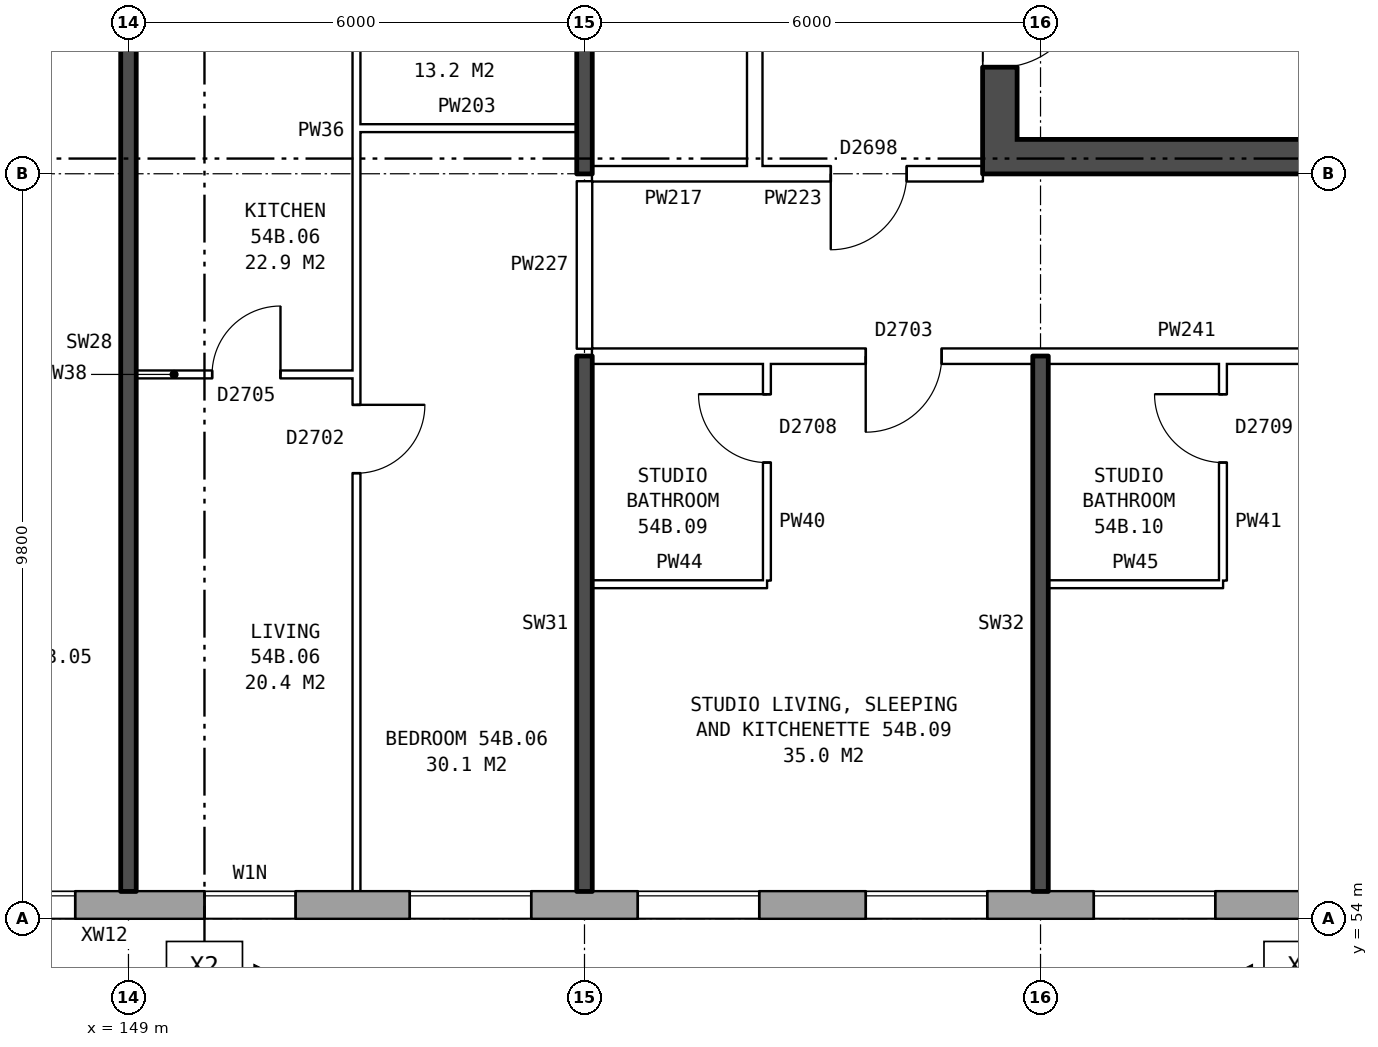
"""IFC4 building model, lengths in metres.
Left out: names, types, materials, properties, quantities, classifications, styles, units other than length and angle.
Written with IfcOpenShell. Run it as: python <this file> out.ifc"""

import sys

from ifc_helpers import new_model, si_unit, direction, frame, frame_2d, origin, place, context, subcontext, project, spatial, rectangle, extrude, element, fill, save


model = new_model("IFC4")
c1 = context("Model", 3, precision=1e-05, world=origin(), true_north=direction((0.0, 1.0)))
c2 = subcontext(c1, "Body", "Model", "MODEL_VIEW")
j1 = project(units=[si_unit("LENGTHUNIT", "METRE"), si_unit("PLANEANGLEUNIT", "RADIAN")], contexts=[c1])
p1 = place(None, origin())
s1 = spatial("IfcSite", under=j1, at=p1, CompositionType="ELEMENT")
p2 = place(p1, origin())
s2 = spatial("IfcBuilding", under=s1, at=p2, CompositionType="ELEMENT")
p3 = place(p2, frame((0.0, 0.0, 191.3)))
s3 = spatial("IfcBuildingStorey", under=s2, at=p3, CompositionType="ELEMENT", Elevation=191.3)
p4 = place(p3, frame((134.075, 54.18, 0.0), z_axis=(0.0, 0.0, 1.0), x_axis=(1.0, 0.0, 0.0)))
e1 = element("IfcWall", 1, at=p4, inside=s3, PredefinedType="STANDARD", context=c2, shape_type="SweptSolid", body=[
    extrude(rectangle(XDim=33.101, YDim=0.36, at=frame_2d((16.55, 0.0))), origin(), (0.0, 0.0, 1.0), 2.85),
])
p5 = place(p4, frame((0.625, 0.0, 0.8)))
e2 = element("IfcOpeningElement", 2, at=p5, cuts=e1, PredefinedType="OPENING", context=c2, shape_type="SweptSolid", body=[
    extrude(rectangle(XDim=1.6, YDim=1.8, at=frame_2d((0.8, 0.9))), frame((0.0, 0.19, 0.0), z_axis=(0.0, -1.0, 0.0), x_axis=(1.0, 0.0, 0.0)), (0.0, 0.0, 1.0), 0.38),
])
p6 = place(p4, frame((3.625, 0.0, 0.8)))
e3 = element("IfcOpeningElement", 3, at=p6, cuts=e1, PredefinedType="OPENING", context=c2, shape_type="SweptSolid", body=[
    extrude(rectangle(XDim=1.6, YDim=1.8, at=frame_2d((0.8, 0.9))), frame((0.0, 0.19, 0.0), z_axis=(0.0, -1.0, 0.0), x_axis=(1.0, 0.0, 0.0)), (0.0, 0.0, 1.0), 0.38),
])
p7 = place(p4, frame((6.625, 0.0, 0.8)))
e4 = element("IfcOpeningElement", 4, at=p7, cuts=e1, PredefinedType="OPENING", context=c2, shape_type="SweptSolid", body=[
    extrude(rectangle(XDim=1.6, YDim=1.8, at=frame_2d((0.8, 0.9))), frame((0.0, 0.19, 0.0), z_axis=(0.0, -1.0, 0.0), x_axis=(1.0, 0.0, 0.0)), (0.0, 0.0, 1.0), 0.38),
])
p8 = place(p4, frame((9.625, 0.0, 0.8)))
e5 = element("IfcOpeningElement", 5, at=p8, cuts=e1, PredefinedType="OPENING", context=c2, shape_type="SweptSolid", body=[
    extrude(rectangle(XDim=1.6, YDim=1.8, at=frame_2d((0.8, 0.9))), frame((0.0, 0.19, 0.0), z_axis=(0.0, -1.0, 0.0), x_axis=(1.0, 0.0, 0.0)), (0.0, 0.0, 1.0), 0.38),
])
p9 = place(p4, frame((12.625, 0.0, 0.8)))
e6 = element("IfcOpeningElement", 6, at=p9, cuts=e1, PredefinedType="OPENING", context=c2, shape_type="SweptSolid", body=[
    extrude(rectangle(XDim=1.6, YDim=1.8, at=frame_2d((0.8, 0.9))), frame((0.0, 0.19, 0.0), z_axis=(0.0, -1.0, 0.0), x_axis=(1.0, 0.0, 0.0)), (0.0, 0.0, 1.0), 0.38),
])
p10 = place(p4, frame((15.925, 0.0, 0.15)))
e7 = element("IfcOpeningElement", 7, at=p10, cuts=e1, PredefinedType="OPENING", context=c2, shape_type="SweptSolid", body=[
    extrude(rectangle(XDim=1.2, YDim=1.2, at=frame_2d((0.6, 0.6))), frame((0.0, 0.19, 0.0), z_axis=(0.0, -1.0, 0.0), x_axis=(1.0, 0.0, 0.0)), (0.0, 0.0, 1.0), 0.38),
])
p11 = place(p4, frame((18.625, 0.0, 0.8)))
e8 = element("IfcOpeningElement", 8, at=p11, cuts=e1, PredefinedType="OPENING", context=c2, shape_type="SweptSolid", body=[
    extrude(rectangle(XDim=1.6, YDim=1.8, at=frame_2d((0.8, 0.9))), frame((0.0, 0.19, 0.0), z_axis=(0.0, -1.0, 0.0), x_axis=(1.0, 0.0, 0.0)), (0.0, 0.0, 1.0), 0.38),
])
p12 = place(p4, frame((21.625, 0.0, 0.8)))
e9 = element("IfcOpeningElement", 9, at=p12, cuts=e1, PredefinedType="OPENING", context=c2, shape_type="SweptSolid", body=[
    extrude(rectangle(XDim=1.6, YDim=1.8, at=frame_2d((0.8, 0.9))), frame((0.0, 0.19, 0.0), z_axis=(0.0, -1.0, 0.0), x_axis=(1.0, 0.0, 0.0)), (0.0, 0.0, 1.0), 0.38),
])
p13 = place(p4, frame((24.625, 0.0, 0.8)))
e10 = element("IfcOpeningElement", 10, at=p13, cuts=e1, PredefinedType="OPENING", context=c2, shape_type="SweptSolid", body=[
    extrude(rectangle(XDim=1.6, YDim=1.8, at=frame_2d((0.8, 0.9))), frame((0.0, 0.19, 0.0), z_axis=(0.0, -1.0, 0.0), x_axis=(1.0, 0.0, 0.0)), (0.0, 0.0, 1.0), 0.38),
])
p14 = place(p4, frame((27.625, 0.0, 0.8)))
e11 = element("IfcOpeningElement", 11, at=p14, cuts=e1, PredefinedType="OPENING", context=c2, shape_type="SweptSolid", body=[
    extrude(rectangle(XDim=1.6, YDim=1.8, at=frame_2d((0.8, 0.9))), frame((0.0, 0.19, 0.0), z_axis=(0.0, -1.0, 0.0), x_axis=(1.0, 0.0, 0.0)), (0.0, 0.0, 1.0), 0.38),
])
p15 = place(p4, frame((30.625, 0.0, 0.8)))
e12 = element("IfcOpeningElement", 12, at=p15, cuts=e1, PredefinedType="OPENING", context=c2, shape_type="SweptSolid", body=[
    extrude(rectangle(XDim=1.6, YDim=1.8, at=frame_2d((0.8, 0.9))), frame((0.0, 0.19, 0.0), z_axis=(0.0, -1.0, 0.0), x_axis=(1.0, 0.0, 0.0)), (0.0, 0.0, 1.0), 0.38),
])
p16 = place(p3, frame((160.465, 76.2, 0.0), z_axis=(0.0, 0.0, 1.0), x_axis=(0.0, -1.0, 0.0)))
e13 = element("IfcWall", 13, at=p16, inside=s3, PredefinedType="SHEAR", context=c2, shape_type="SweptSolid", body=[
    extrude(rectangle(XDim=12.4, YDim=0.45, at=frame_2d((6.2, 0.0))), origin(), (0.0, 0.0, 1.0), 2.85),
])
p17 = place(p16, frame((1.325, 0.0, 0.0)))
e14 = element("IfcOpeningElement", 14, at=p17, cuts=e13, PredefinedType="OPENING", context=c2, shape_type="SweptSolid", body=[
    extrude(rectangle(XDim=1.1, YDim=2.1, at=frame_2d((0.55, 1.05))), frame((0.0, 0.235, 0.0), z_axis=(0.0, -1.0, 0.0), x_axis=(1.0, 0.0, 0.0)), (0.0, 0.0, 1.0), 0.47),
])
p18 = place(p16, frame((3.825, 0.0, 0.0)))
e15 = element("IfcOpeningElement", 15, at=p18, cuts=e13, PredefinedType="OPENING", context=c2, shape_type="SweptSolid", body=[
    extrude(rectangle(XDim=0.85, YDim=2.1, at=frame_2d((0.425, 1.05))), frame((0.0, 0.235, 0.0), z_axis=(0.0, -1.0, 0.0), x_axis=(1.0, 0.0, 0.0)), (0.0, 0.0, 1.0), 0.47),
])
p19 = place(p16, frame((5.975, 0.0, 0.0)))
e16 = element("IfcOpeningElement", 16, at=p19, cuts=e13, PredefinedType="OPENING", context=c2, shape_type="SweptSolid", body=[
    extrude(rectangle(XDim=0.85, YDim=2.1, at=frame_2d((0.425, 1.05))), frame((0.0, 0.235, 0.0), z_axis=(0.0, -1.0, 0.0), x_axis=(1.0, 0.0, 0.0)), (0.0, 0.0, 1.0), 0.47),
])
p20 = place(p16, frame((9.9, 0.0, 0.0)))
e17 = element("IfcOpeningElement", 17, at=p20, cuts=e13, PredefinedType="OPENING", context=c2, shape_type="SweptSolid", body=[
    extrude(rectangle(XDim=1.1, YDim=2.1, at=frame_2d((0.55, 1.05))), frame((0.0, 0.235, 0.0), z_axis=(0.0, -1.0, 0.0), x_axis=(1.0, 0.0, 0.0)), (0.0, 0.0, 1.0), 0.47),
])
p21 = place(p16, frame((8.125, 0.0, 0.0)))
e18 = element("IfcOpeningElement", 18, at=p21, cuts=e13, PredefinedType="OPENING", context=c2, shape_type="SweptSolid", body=[
    extrude(rectangle(XDim=0.85, YDim=2.1, at=frame_2d((0.425, 1.05))), frame((0.0, 0.235, 0.0), z_axis=(0.0, -1.0, 0.0), x_axis=(1.0, 0.0, 0.0)), (0.0, 0.0, 1.0), 0.47),
])
p22 = place(p3, frame((160.69, 64.025, 0.0), z_axis=(0.0, 0.0, 1.0), x_axis=(1.0, 0.0, 0.0)))
e19 = element("IfcWall", 19, at=p22, inside=s3, PredefinedType="SHEAR", context=c2, shape_type="SweptSolid", body=[
    extrude(rectangle(XDim=7.5, YDim=0.45, at=frame_2d((3.75, 0.0))), origin(), (0.0, 0.0, 1.0), 2.85),
])
p23 = place(p3, frame((157.24, 63.9, 0.0), z_axis=(0.0, 0.0, 1.0), x_axis=(0.0, 1.0, 0.0)))
e20 = element("IfcWall", 20, at=p23, inside=s3, PredefinedType="PARTITIONING", context=c2, shape_type="SweptSolid", body=[
    extrude(rectangle(XDim=12.2, YDim=0.2, at=frame_2d((6.1, 0.0))), origin(), (0.0, 0.0, 1.0), 2.85),
])
p24 = place(p23, frame((5.1, 0.0, 0.0)))
e21 = element("IfcOpeningElement", 21, at=p24, cuts=e20, PredefinedType="OPENING", context=c2, shape_type="SweptSolid", body=[
    extrude(rectangle(XDim=2.0, YDim=2.1, at=frame_2d((1.0, 1.05))), frame((0.0, 0.11, 0.0), z_axis=(0.0, -1.0, 0.0), x_axis=(1.0, 0.0, 0.0)), (0.0, 0.0, 1.0), 0.22),
])
for number, where, z_axis, x_axis in (
    (22, (155.1, 58.4, 0.0), (0.0, 0.0, 1.0), (1.0, 0.0, 0.0)),
    (23, (161.1, 58.4, 0.0), (0.0, 0.0, 1.0), (1.0, 0.0, 0.0)),
):
    element("IfcWall", number, at=place(p3, frame(where, z_axis=z_axis, x_axis=x_axis)), inside=s3, PredefinedType="PARTITIONING", context=c2, shape_type="SweptSolid", body=[
        extrude(rectangle(XDim=2.3, YDim=0.1, at=frame_2d((1.15, 0.0))), origin(), (0.0, 0.0, 1.0), 2.85),
    ])
p25 = place(p3, frame((149.1, 61.16, 0.0), z_axis=(0.0, 0.0, 1.0), x_axis=(1.0, 0.0, 0.0)))
e24 = element("IfcWall", 24, at=p25, inside=s3, PredefinedType="PARTITIONING", context=c2, shape_type="SweptSolid", body=[
    extrude(rectangle(XDim=2.9, YDim=0.1, at=frame_2d((1.45, 0.0))), origin(), (0.0, 0.0, 1.0), 2.85),
])
p26 = place(p25, frame((1.0, 0.0, 0.0)))
e25 = element("IfcOpeningElement", 25, at=p26, cuts=e24, PredefinedType="OPENING", context=c2, shape_type="SweptSolid", body=[
    extrude(rectangle(XDim=0.9, YDim=2.1, at=frame_2d((0.45, 1.05))), frame((0.0, 0.06, 0.0), z_axis=(0.0, -1.0, 0.0), x_axis=(1.0, 0.0, 0.0)), (0.0, 0.0, 1.0), 0.12),
])
p27 = place(p3, frame((155.1, 61.4, 0.0), z_axis=(0.0, 0.0, 1.0), x_axis=(1.0, 0.0, 0.0)))
e26 = element("IfcWall", 26, at=p27, inside=s3, PredefinedType="PARTITIONING", context=c2, shape_type="SweptSolid", body=[
    extrude(rectangle(XDim=14.79, YDim=0.2, at=frame_2d((7.395, 0.0))), origin(), (0.0, 0.0, 1.0), 2.85),
])
p28 = place(p27, frame((3.6, 0.0, 0.0)))
e27 = element("IfcOpeningElement", 27, at=p28, cuts=e26, PredefinedType="OPENING", context=c2, shape_type="SweptSolid", body=[
    extrude(rectangle(XDim=1.0, YDim=2.1, at=frame_2d((0.5, 1.05))), frame((0.0, 0.11, 0.0), z_axis=(0.0, -1.0, 0.0), x_axis=(1.0, 0.0, 0.0)), (0.0, 0.0, 1.0), 0.22),
])
p29 = place(p27, frame((11.045, 0.0, 0.0)))
e28 = element("IfcOpeningElement", 28, at=p29, cuts=e26, PredefinedType="OPENING", context=c2, shape_type="SweptSolid", body=[
    extrude(rectangle(XDim=1.0, YDim=2.1, at=frame_2d((0.5, 1.05))), frame((0.0, 0.11, 0.0), z_axis=(0.0, -1.0, 0.0), x_axis=(1.0, 0.0, 0.0)), (0.0, 0.0, 1.0), 0.22),
])
p30 = place(p3, frame((155.1, 63.8, 0.0), z_axis=(0.0, 0.0, 1.0), x_axis=(1.0, 0.0, 0.0)))
e29 = element("IfcWall", 29, at=p30, inside=s3, PredefinedType="PARTITIONING", context=c2, shape_type="SweptSolid", body=[
    extrude(rectangle(XDim=2.14, YDim=0.2, at=frame_2d((1.07, 0.0))), origin(), (0.0, 0.0, 1.0), 2.85),
])
p31 = place(p3, frame((157.24, 63.8, 0.0), z_axis=(0.0, 0.0, 1.0), x_axis=(1.0, 0.0, 0.0)))
e30 = element("IfcWall", 30, at=p31, inside=s3, PredefinedType="PARTITIONING", context=c2, shape_type="SweptSolid", body=[
    extrude(rectangle(XDim=3.0, YDim=0.2, at=frame_2d((1.5, 0.0))), origin(), (0.0, 0.0, 1.0), 2.85),
])
p32 = place(p31, frame((1.0, 0.0, 0.0)))
e31 = element("IfcOpeningElement", 31, at=p32, cuts=e30, PredefinedType="OPENING", context=c2, shape_type="SweptSolid", body=[
    extrude(rectangle(XDim=1.0, YDim=2.1, at=frame_2d((0.5, 1.05))), frame((0.0, 0.11, 0.0), z_axis=(0.0, -1.0, 0.0), x_axis=(1.0, 0.0, 0.0)), (0.0, 0.0, 1.0), 0.22),
])
p33 = place(p3, frame((152.0, 64.4, 0.0), z_axis=(0.0, 0.0, 1.0), x_axis=(1.0, 0.0, 0.0)))
e32 = element("IfcWall", 32, at=p33, inside=s3, PredefinedType="PARTITIONING", context=c2, shape_type="SweptSolid", body=[
    extrude(rectangle(XDim=2.9, YDim=0.1, at=frame_2d((1.45, 0.0))), origin(), (0.0, 0.0, 1.0), 2.85),
])
p34 = place(p3, frame((149.0, 54.36, 0.0), z_axis=(0.0, 0.0, 1.0), x_axis=(0.0, 1.0, 0.0)))
e33 = element("IfcWall", 33, at=p34, inside=s3, PredefinedType="SOLIDWALL", context=c2, shape_type="SweptSolid", body=[
    extrude(rectangle(XDim=14.44, YDim=0.2, at=frame_2d((7.22, 0.0))), origin(), (0.0, 0.0, 1.0), 2.85),
])
p35 = place(p3, frame((152.0, 54.36, 0.0), z_axis=(0.0, 0.0, 1.0), x_axis=(0.0, 1.0, 0.0)))
e34 = element("IfcWall", 34, at=p35, inside=s3, PredefinedType="PARTITIONING", context=c2, shape_type="SweptSolid", body=[
    extrude(rectangle(XDim=14.34, YDim=0.1, at=frame_2d((7.17, 0.0))), origin(), (0.0, 0.0, 1.0), 2.85),
])
p36 = place(p35, frame((5.5, 0.0, 0.0)))
e35 = element("IfcOpeningElement", 35, at=p36, cuts=e34, PredefinedType="OPENING", context=c2, shape_type="SweptSolid", body=[
    extrude(rectangle(XDim=0.9, YDim=2.1, at=frame_2d((0.45, 1.05))), frame((0.0, 0.06, 0.0), z_axis=(0.0, -1.0, 0.0), x_axis=(1.0, 0.0, 0.0)), (0.0, 0.0, 1.0), 0.12),
])
p37 = place(p35, frame((13.04, 0.0, 0.0)))
e36 = element("IfcOpeningElement", 36, at=p37, cuts=e34, PredefinedType="OPENING", context=c2, shape_type="SweptSolid", body=[
    extrude(rectangle(XDim=0.9, YDim=2.1, at=frame_2d((0.45, 1.05))), frame((0.0, 0.06, 0.0), z_axis=(0.0, -1.0, 0.0), x_axis=(1.0, 0.0, 0.0)), (0.0, 0.0, 1.0), 0.12),
])
p38 = place(p3, frame((155.0, 54.36, 0.0), z_axis=(0.0, 0.0, 1.0), x_axis=(0.0, 1.0, 0.0)))
e37 = element("IfcWall", 37, at=p38, inside=s3, PredefinedType="SOLIDWALL", context=c2, shape_type="SweptSolid", body=[
    extrude(rectangle(XDim=7.04, YDim=0.2, at=frame_2d((3.52, 0.0))), origin(), (0.0, 0.0, 1.0), 2.85),
])
p39 = place(p3, frame((155.0, 61.5, 0.0), z_axis=(0.0, 0.0, 1.0), x_axis=(0.0, 1.0, 0.0)))
e38 = element("IfcWall", 38, at=p39, inside=s3, PredefinedType="PARTITIONING", context=c2, shape_type="SweptSolid", body=[
    extrude(rectangle(XDim=2.2, YDim=0.2, at=frame_2d((1.1, 0.0))), origin(), (0.0, 0.0, 1.0), 2.85),
])
p40 = place(p3, frame((155.0, 63.8, 0.0), z_axis=(0.0, 0.0, 1.0), x_axis=(0.0, 1.0, 0.0)))
e39 = element("IfcWall", 39, at=p40, inside=s3, PredefinedType="SOLIDWALL", context=c2, shape_type="SweptSolid", body=[
    extrude(rectangle(XDim=5.0, YDim=0.2, at=frame_2d((2.5, 0.0))), origin(), (0.0, 0.0, 1.0), 2.85),
])
p41 = place(p3, frame((157.4, 58.45, 0.0), z_axis=(0.0, 0.0, 1.0), x_axis=(0.0, 1.0, 0.0)))
e40 = element("IfcWall", 40, at=p41, inside=s3, PredefinedType="PARTITIONING", context=c2, shape_type="SweptSolid", body=[
    extrude(rectangle(XDim=2.85, YDim=0.1, at=frame_2d((1.425, 0.0))), origin(), (0.0, 0.0, 1.0), 2.85),
])
p42 = place(p41, frame((1.55, 0.0, 0.0)))
e41 = element("IfcOpeningElement", 41, at=p42, cuts=e40, PredefinedType="OPENING", context=c2, shape_type="SweptSolid", body=[
    extrude(rectangle(XDim=0.9, YDim=2.1, at=frame_2d((0.45, 1.05))), frame((0.0, 0.06, 0.0), z_axis=(0.0, -1.0, 0.0), x_axis=(1.0, 0.0, 0.0)), (0.0, 0.0, 1.0), 0.12),
])
p43 = place(p3, frame((161.0, 54.36, 0.0), z_axis=(0.0, 0.0, 1.0), x_axis=(0.0, 1.0, 0.0)))
e42 = element("IfcWall", 42, at=p43, inside=s3, PredefinedType="SOLIDWALL", context=c2, shape_type="SweptSolid", body=[
    extrude(rectangle(XDim=7.04, YDim=0.2, at=frame_2d((3.52, 0.0))), origin(), (0.0, 0.0, 1.0), 2.85),
])
p44 = place(p3, frame((163.4, 58.45, 0.0), z_axis=(0.0, 0.0, 1.0), x_axis=(0.0, 1.0, 0.0)))
e43 = element("IfcWall", 43, at=p44, inside=s3, PredefinedType="PARTITIONING", context=c2, shape_type="SweptSolid", body=[
    extrude(rectangle(XDim=2.85, YDim=0.1, at=frame_2d((1.425, 0.0))), origin(), (0.0, 0.0, 1.0), 2.85),
])
p45 = place(p44, frame((1.55, 0.0, 0.0)))
e44 = element("IfcOpeningElement", 44, at=p45, cuts=e43, PredefinedType="OPENING", context=c2, shape_type="SweptSolid", body=[
    extrude(rectangle(XDim=0.9, YDim=2.1, at=frame_2d((0.45, 1.05))), frame((0.0, 0.06, 0.0), z_axis=(0.0, -1.0, 0.0), x_axis=(1.0, 0.0, 0.0)), (0.0, 0.0, 1.0), 0.12),
])
p46 = place(p9, origin())
e45 = element("IfcWindow", 45, at=p46, inside=s3, PartitioningType="SINGLE_PANEL", PredefinedType="WINDOW", context=c2, shape_type="SweptSolid", body=[
    extrude(rectangle(XDim=1.6, YDim=1.8, at=frame_2d((0.8, 0.9))), frame((0.0, 0.15, 0.0), z_axis=(0.0, -1.0, 0.0), x_axis=(1.0, 0.0, 0.0)), (0.0, 0.0, 1.0), 0.06),
])
fill(e6, e45)
p47 = place(p10, origin())
e46 = element("IfcWindow", 46, at=p47, inside=s3, PartitioningType="SINGLE_PANEL", PredefinedType="WINDOW", context=c2, shape_type="SweptSolid", body=[
    extrude(rectangle(XDim=1.2, YDim=1.2, at=frame_2d((0.6, 0.6))), frame((0.0, 0.15, 0.0), z_axis=(0.0, -1.0, 0.0), x_axis=(1.0, 0.0, 0.0)), (0.0, 0.0, 1.0), 0.06),
])
fill(e7, e46)
p48 = place(p11, origin())
e47 = element("IfcWindow", 47, at=p48, inside=s3, PartitioningType="SINGLE_PANEL", PredefinedType="WINDOW", context=c2, shape_type="SweptSolid", body=[
    extrude(rectangle(XDim=1.6, YDim=1.8, at=frame_2d((0.8, 0.9))), frame((0.0, 0.15, 0.0), z_axis=(0.0, -1.0, 0.0), x_axis=(1.0, 0.0, 0.0)), (0.0, 0.0, 1.0), 0.06),
])
fill(e8, e47)
p49 = place(p12, origin())
e48 = element("IfcWindow", 48, at=p49, inside=s3, PartitioningType="SINGLE_PANEL", PredefinedType="WINDOW", context=c2, shape_type="SweptSolid", body=[
    extrude(rectangle(XDim=1.6, YDim=1.8, at=frame_2d((0.8, 0.9))), frame((0.0, 0.15, 0.0), z_axis=(0.0, -1.0, 0.0), x_axis=(1.0, 0.0, 0.0)), (0.0, 0.0, 1.0), 0.06),
])
fill(e9, e48)
p50 = place(p13, origin())
e49 = element("IfcWindow", 49, at=p50, inside=s3, PartitioningType="SINGLE_PANEL", PredefinedType="WINDOW", context=c2, shape_type="SweptSolid", body=[
    extrude(rectangle(XDim=1.6, YDim=1.8, at=frame_2d((0.8, 0.9))), frame((0.0, 0.15, 0.0), z_axis=(0.0, -1.0, 0.0), x_axis=(1.0, 0.0, 0.0)), (0.0, 0.0, 1.0), 0.06),
])
fill(e10, e49)
p51 = place(p14, origin())
e50 = element("IfcWindow", 50, at=p51, inside=s3, PartitioningType="SINGLE_PANEL", PredefinedType="WINDOW", context=c2, shape_type="SweptSolid", body=[
    extrude(rectangle(XDim=1.6, YDim=1.8, at=frame_2d((0.8, 0.9))), frame((0.0, 0.15, 0.0), z_axis=(0.0, -1.0, 0.0), x_axis=(1.0, 0.0, 0.0)), (0.0, 0.0, 1.0), 0.06),
])
fill(e11, e50)
p52 = place(p20, origin())
e51 = element("IfcDoor", 51, at=p52, inside=s3, OperationType="SINGLE_SWING_LEFT", PredefinedType="DOOR", context=c2, shape_type="SweptSolid", body=[
    extrude(rectangle(XDim=1.1, YDim=2.1, at=frame_2d((0.55, 1.05))), frame((0.0, 0.21, 0.0), z_axis=(0.0, -1.0, 0.0), x_axis=(1.0, 0.0, 0.0)), (0.0, 0.0, 1.0), 0.05),
])
fill(e17, e51)
p53 = place(p32, frame((1.0, 0.0, 0.0), z_axis=(0.0, 0.0, 1.0), x_axis=(-1.0, 0.0, 0.0)))
e52 = element("IfcDoor", 52, at=p53, inside=s3, OperationType="SINGLE_SWING_RIGHT", PredefinedType="DOOR", context=c2, shape_type="SweptSolid", body=[
    extrude(rectangle(XDim=1.0, YDim=2.1, at=frame_2d((0.5, 1.05))), frame((0.0, 0.025, 0.0), z_axis=(0.0, -1.0, 0.0), x_axis=(1.0, 0.0, 0.0)), (0.0, 0.0, 1.0), 0.05),
])
fill(e31, e52)
p54 = place(p36, frame((0.9, 0.0, 0.0), z_axis=(0.0, 0.0, 1.0), x_axis=(-1.0, 0.0, 0.0)))
e53 = element("IfcDoor", 53, at=p54, inside=s3, OperationType="SINGLE_SWING_LEFT", PredefinedType="DOOR", context=c2, shape_type="SweptSolid", body=[
    extrude(rectangle(XDim=0.9, YDim=2.1, at=frame_2d((0.45, 1.05))), frame((0.0, 0.025, 0.0), z_axis=(0.0, -1.0, 0.0), x_axis=(1.0, 0.0, 0.0)), (0.0, 0.0, 1.0), 0.05),
])
fill(e35, e53)
p55 = place(p26, origin())
e54 = element("IfcDoor", 54, at=p55, inside=s3, OperationType="SINGLE_SWING_RIGHT", PredefinedType="DOOR", context=c2, shape_type="SweptSolid", body=[
    extrude(rectangle(XDim=0.9, YDim=2.1, at=frame_2d((0.45, 1.05))), frame((0.0, 0.025, 0.0), z_axis=(0.0, -1.0, 0.0), x_axis=(1.0, 0.0, 0.0)), (0.0, 0.0, 1.0), 0.05),
])
fill(e25, e54)
p56 = place(p28, frame((1.0, 0.0, 0.0), z_axis=(0.0, 0.0, 1.0), x_axis=(-1.0, 0.0, 0.0)))
e55 = element("IfcDoor", 55, at=p56, inside=s3, OperationType="SINGLE_SWING_RIGHT", PredefinedType="DOOR", context=c2, shape_type="SweptSolid", body=[
    extrude(rectangle(XDim=1.0, YDim=2.1, at=frame_2d((0.5, 1.05))), frame((0.0, 0.025, 0.0), z_axis=(0.0, -1.0, 0.0), x_axis=(1.0, 0.0, 0.0)), (0.0, 0.0, 1.0), 0.05),
])
fill(e27, e55)
p57 = place(p42, origin())
e56 = element("IfcDoor", 56, at=p57, inside=s3, OperationType="SINGLE_SWING_RIGHT", PredefinedType="DOOR", context=c2, shape_type="SweptSolid", body=[
    extrude(rectangle(XDim=0.9, YDim=2.1, at=frame_2d((0.45, 1.05))), frame((0.0, 0.025, 0.0), z_axis=(0.0, -1.0, 0.0), x_axis=(1.0, 0.0, 0.0)), (0.0, 0.0, 1.0), 0.05),
])
fill(e41, e56)
p58 = place(p45, origin())
e57 = element("IfcDoor", 57, at=p58, inside=s3, OperationType="SINGLE_SWING_RIGHT", PredefinedType="DOOR", context=c2, shape_type="SweptSolid", body=[
    extrude(rectangle(XDim=0.9, YDim=2.1, at=frame_2d((0.45, 1.05))), frame((0.0, 0.025, 0.0), z_axis=(0.0, -1.0, 0.0), x_axis=(1.0, 0.0, 0.0)), (0.0, 0.0, 1.0), 0.05),
])
fill(e44, e57)
save(model, sys.argv[1])
